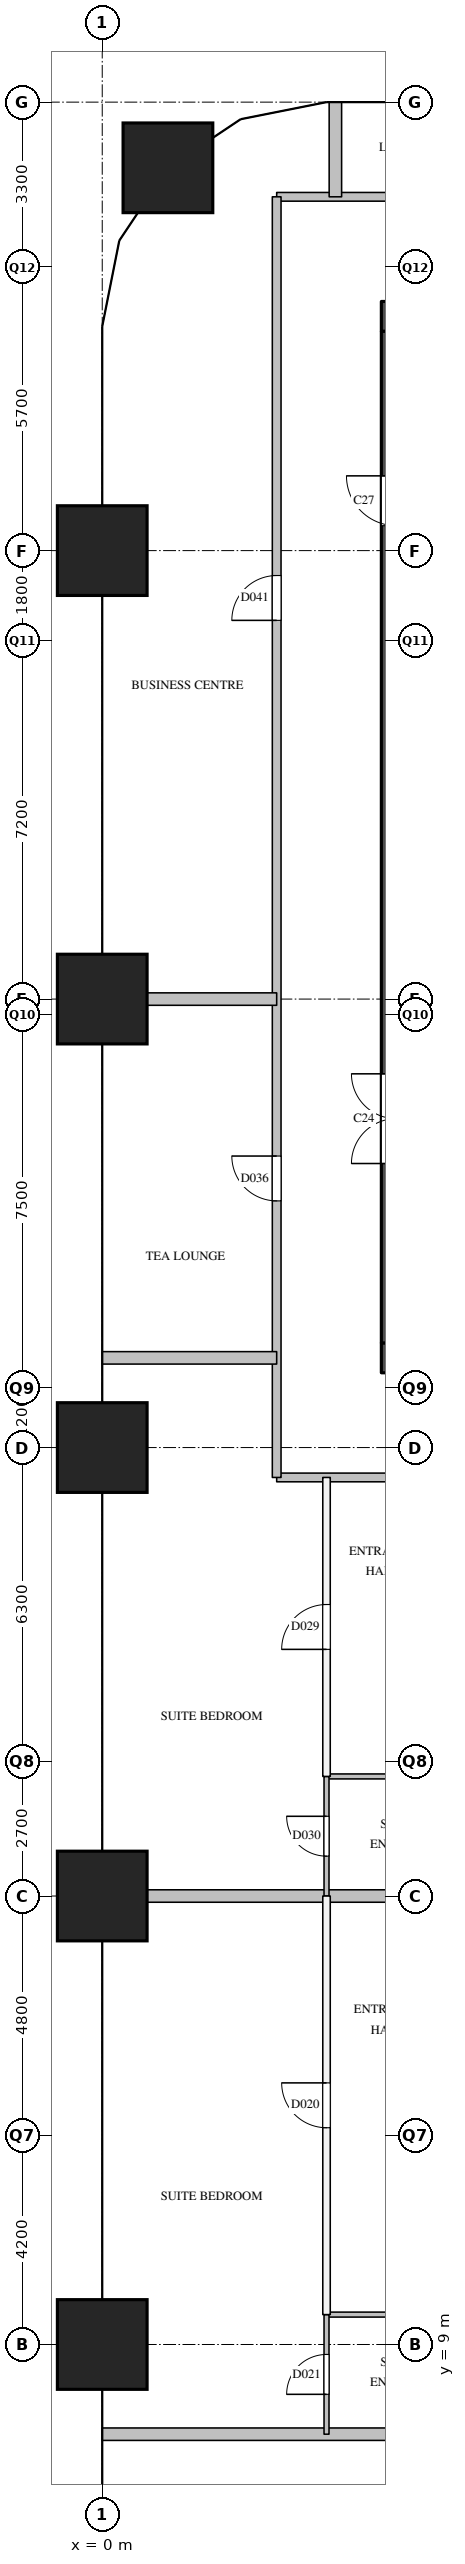
"""IFC4 building model, lengths in metres.
Left out: names, types, materials, properties, quantities, classifications, styles, units other than length and angle.
Written with IfcOpenShell. Run it as: python <this file> out.ifc"""

import sys

from ifc_helpers import new_model, si_unit, direction, frame, frame_2d, origin, origin_2d, place, context, subcontext, project, spatial, rectangle, extrude, element, fill, save


model = new_model("IFC4")
c1 = context("Model", 3, precision=1e-05, world=origin(), true_north=direction((0.0, 1.0)))
c2 = subcontext(c1, "Body", "Model", "MODEL_VIEW")
j1 = project(units=[si_unit("LENGTHUNIT", "METRE"), si_unit("PLANEANGLEUNIT", "RADIAN")], contexts=[c1])
p1 = place(None, origin())
s1 = spatial("IfcSite", under=j1, at=p1, CompositionType="ELEMENT")
p2 = place(p1, origin())
s2 = spatial("IfcBuilding", under=s1, at=p2, CompositionType="ELEMENT")
p3 = place(p2, frame((0.0, 0.0, 69.0)))
s3 = spatial("IfcBuildingStorey", under=s2, at=p3, CompositionType="ELEMENT", Elevation=69.0)
for number, where, z_axis, x_axis in (
    (1, (0.0, 9.0, 0.0), (0.0, 0.0, 1.0), (1.0, 0.0, 0.0)),
    (2, (0.0, 18.0, 0.0), (0.0, 0.0, 1.0), (1.0, 0.0, 0.0)),
    (3, (0.0, 27.0, 0.0), (0.0, 0.0, 1.0), (1.0, 0.0, 0.0)),
    (4, (0.0, 36.0, 0.0), (0.0, 0.0, 1.0), (1.0, 0.0, 0.0)),
    (5, (0.0, 45.0, 0.0), (0.0, 0.0, 1.0), (1.0, 0.0, 0.0)),
    (6, (1.318, 52.682, 0.0), (0.0, 0.0, 1.0), (1.0, 0.0, 0.0)),
):
    element("IfcColumn", number, at=place(p3, frame(where, z_axis=z_axis, x_axis=x_axis)), inside=s3, PredefinedType="COLUMN", context=c2, shape_type="SweptSolid", body=[
        extrude(rectangle(XDim=1.8, YDim=1.8, at=origin_2d()), origin(), (0.0, 0.0, 1.0), 3.8),
    ])
p4 = place(p3, frame((5.6, 28.8, 0.0), z_axis=(0.0, 0.0, 1.0), x_axis=(1.0, 0.0, 0.0)))
e7 = element("IfcWall", 7, at=p4, inside=s3, PredefinedType="SHEAR", context=c2, shape_type="SweptSolid", body=[
    extrude(rectangle(XDim=12.4, YDim=0.6, at=frame_2d((6.2, 0.0))), origin(), (0.0, 0.0, 1.0), 3.5),
])
p5 = place(p4, frame((1.05, 0.0, 0.0)))
e8 = element("IfcOpeningElement", 8, at=p5, cuts=e7, PredefinedType="OPENING", context=c2, shape_type="SweptSolid", body=[
    extrude(rectangle(XDim=1.2, YDim=2.1, at=frame_2d((0.6, 1.05))), frame((0.0, 0.31, 0.0), z_axis=(0.0, -1.0, 0.0), x_axis=(1.0, 0.0, 0.0)), (0.0, 0.0, 1.0), 0.62),
])
p6 = place(p4, frame((5.25, 0.0, 0.0)))
e9 = element("IfcOpeningElement", 9, at=p6, cuts=e7, PredefinedType="OPENING", context=c2, shape_type="SweptSolid", body=[
    extrude(rectangle(XDim=1.2, YDim=2.1, at=frame_2d((0.6, 1.05))), frame((0.0, 0.31, 0.0), z_axis=(0.0, -1.0, 0.0), x_axis=(1.0, 0.0, 0.0)), (0.0, 0.0, 1.0), 0.62),
])
p7 = place(p4, frame((7.35, 0.0, 0.0)))
e10 = element("IfcOpeningElement", 10, at=p7, cuts=e7, PredefinedType="OPENING", context=c2, shape_type="SweptSolid", body=[
    extrude(rectangle(XDim=1.2, YDim=2.1, at=frame_2d((0.6, 1.05))), frame((0.0, 0.31, 0.0), z_axis=(0.0, -1.0, 0.0), x_axis=(1.0, 0.0, 0.0)), (0.0, 0.0, 1.0), 0.62),
])
p8 = place(p3, frame((5.6, 49.7, 0.0), z_axis=(0.0, 0.0, 1.0), x_axis=(1.0, 0.0, 0.0)))
e11 = element("IfcWall", 11, at=p8, inside=s3, PredefinedType="SHEAR", context=c2, shape_type="SweptSolid", body=[
    extrude(rectangle(XDim=12.4, YDim=0.6, at=frame_2d((6.2, 0.0))), origin(), (0.0, 0.0, 1.0), 3.5),
])
p9 = place(p3, frame((5.9, 29.1, 0.0), z_axis=(0.0, 0.0, 1.0), x_axis=(0.0, 1.0, 0.0)))
e12 = element("IfcWall", 12, at=p9, inside=s3, PredefinedType="SHEAR", context=c2, shape_type="SweptSolid", body=[
    extrude(rectangle(XDim=20.3, YDim=0.6, at=frame_2d((10.15, 0.0))), origin(), (0.0, 0.0, 1.0), 3.5),
])
p10 = place(p9, frame((3.6, 0.0, 0.0)))
e13 = element("IfcOpeningElement", 13, at=p10, cuts=e12, PredefinedType="OPENING", context=c2, shape_type="SweptSolid", body=[
    extrude(rectangle(XDim=1.8, YDim=2.1, at=frame_2d((0.9, 1.05))), frame((0.0, 0.31, 0.0), z_axis=(0.0, -1.0, 0.0), x_axis=(1.0, 0.0, 0.0)), (0.0, 0.0, 1.0), 0.62),
])
p11 = place(p9, frame((16.4, 0.0, 0.0)))
e14 = element("IfcOpeningElement", 14, at=p11, cuts=e12, PredefinedType="OPENING", context=c2, shape_type="SweptSolid", body=[
    extrude(rectangle(XDim=1.0, YDim=2.1, at=frame_2d((0.5, 1.05))), frame((0.0, 0.31, 0.0), z_axis=(0.0, -1.0, 0.0), x_axis=(1.0, 0.0, 0.0)), (0.0, 0.0, 1.0), 0.62),
])
p12 = place(p3, frame((3.5, 26.4, 0.0), z_axis=(0.0, 0.0, 1.0), x_axis=(1.0, 0.0, 0.0)))
e15 = element("IfcWall", 15, at=p12, inside=s3, PredefinedType="PARTITIONING", context=c2, shape_type="SweptSolid", body=[
    extrude(rectangle(XDim=3.18, YDim=0.175, at=frame_2d((1.59, 0.0))), origin(), (0.0, 0.0, 1.0), 3.5),
])
p13 = place(p3, frame((3.5, 52.1, 0.0), z_axis=(0.0, 0.0, 1.0), x_axis=(1.0, 0.0, 0.0)))
e16 = element("IfcWall", 16, at=p13, inside=s3, PredefinedType="PARTITIONING", context=c2, shape_type="SweptSolid", body=[
    extrude(rectangle(XDim=16.6, YDim=0.175, at=frame_2d((8.3, 0.0))), origin(), (0.0, 0.0, 1.0), 3.5),
])
p14 = place(p13, frame((7.389, 0.0, 0.0)))
e17 = element("IfcOpeningElement", 17, at=p14, cuts=e16, PredefinedType="OPENING", context=c2, shape_type="SweptSolid", body=[
    extrude(rectangle(XDim=0.9, YDim=2.1, at=frame_2d((0.45, 1.05))), frame((0.0, 0.097, 0.0), z_axis=(0.0, -1.0, 0.0), x_axis=(1.0, 0.0, 0.0)), (0.0, 0.0, 1.0), 0.195),
])
p15 = place(p3, frame((3.5, 26.4, 0.0), z_axis=(0.0, 0.0, 1.0), x_axis=(0.0, 1.0, 0.0)))
e18 = element("IfcWall", 18, at=p15, inside=s3, PredefinedType="PARTITIONING", context=c2, shape_type="SweptSolid", body=[
    extrude(rectangle(XDim=25.7, YDim=0.175, at=frame_2d((12.85, 0.0))), origin(), (0.0, 0.0, 1.0), 2.5),
])
p16 = place(p15, frame((5.55, 0.0, 0.0)))
e19 = element("IfcOpeningElement", 19, at=p16, cuts=e18, PredefinedType="OPENING", context=c2, shape_type="SweptSolid", body=[
    extrude(rectangle(XDim=0.9, YDim=2.1, at=frame_2d((0.45, 1.05))), frame((0.0, 0.097, 0.0), z_axis=(0.0, -1.0, 0.0), x_axis=(1.0, 0.0, 0.0)), (0.0, 0.0, 1.0), 0.195),
])
p17 = place(p15, frame((17.2, 0.0, 0.0)))
e20 = element("IfcOpeningElement", 20, at=p17, cuts=e18, PredefinedType="OPENING", context=c2, shape_type="SweptSolid", body=[
    extrude(rectangle(XDim=0.9, YDim=2.1, at=frame_2d((0.45, 1.05))), frame((0.0, 0.097, 0.0), z_axis=(0.0, -1.0, 0.0), x_axis=(1.0, 0.0, 0.0)), (0.0, 0.0, 1.0), 0.195),
])
p18 = place(p3, frame((4.5, 9.6, 0.0), z_axis=(0.0, 0.0, 1.0), x_axis=(0.0, 1.0, 0.0)))
e21 = element("IfcWall", 21, at=p18, inside=s3, PredefinedType="PARTITIONING", context=c2, shape_type="SweptSolid", body=[
    extrude(rectangle(XDim=8.4, YDim=0.15, at=frame_2d((4.2, 0.0))), origin(), (0.0, 0.0, 1.0), 3.5),
])
p19 = place(p18, frame((3.75, 0.0, 0.0)))
e22 = element("IfcOpeningElement", 22, at=p19, cuts=e21, PredefinedType="OPENING", context=c2, shape_type="SweptSolid", body=[
    extrude(rectangle(XDim=0.9, YDim=2.1, at=frame_2d((0.45, 1.05))), frame((0.0, 0.085, 0.0), z_axis=(0.0, -1.0, 0.0), x_axis=(1.0, 0.0, 0.0)), (0.0, 0.0, 1.0), 0.17),
])
p20 = place(p3, frame((4.5, 20.4, 0.0), z_axis=(0.0, 0.0, 1.0), x_axis=(0.0, 1.0, 0.0)))
e23 = element("IfcWall", 23, at=p20, inside=s3, PredefinedType="PARTITIONING", context=c2, shape_type="SweptSolid", body=[
    extrude(rectangle(XDim=6.0, YDim=0.15, at=frame_2d((3.0, 0.0))), origin(), (0.0, 0.0, 1.0), 3.5),
])
p21 = place(p20, frame((2.55, 0.0, 0.0)))
e24 = element("IfcOpeningElement", 24, at=p21, cuts=e23, PredefinedType="OPENING", context=c2, shape_type="SweptSolid", body=[
    extrude(rectangle(XDim=0.9, YDim=2.1, at=frame_2d((0.45, 1.05))), frame((0.0, 0.085, 0.0), z_axis=(0.0, -1.0, 0.0), x_axis=(1.0, 0.0, 0.0)), (0.0, 0.0, 1.0), 0.17),
])
p22 = place(p3, frame((0.0, 7.2, 0.0), z_axis=(0.0, 0.0, 1.0), x_axis=(1.0, 0.0, 0.0)))
e25 = element("IfcWall", 25, at=p22, inside=s3, PredefinedType="PARTITIONING", context=c2, shape_type="SweptSolid", body=[
    extrude(rectangle(XDim=6.9, YDim=0.25, at=frame_2d((3.45, 0.0))), origin(), (0.0, 0.0, 1.0), 2.5),
])
p23 = place(p3, frame((0.0, 18.0, 0.0), z_axis=(0.0, 0.0, 1.0), x_axis=(1.0, 0.0, 0.0)))
e26 = element("IfcWall", 26, at=p23, inside=s3, PredefinedType="PARTITIONING", context=c2, shape_type="SweptSolid", body=[
    extrude(rectangle(XDim=6.9, YDim=0.25, at=frame_2d((3.45, 0.0))), origin(), (0.0, 0.0, 1.0), 3.5),
])
p24 = place(p3, frame((0.0, 28.8, 0.0), z_axis=(0.0, 0.0, 1.0), x_axis=(1.0, 0.0, 0.0)))
e27 = element("IfcWall", 27, at=p24, inside=s3, PredefinedType="PARTITIONING", context=c2, shape_type="SweptSolid", body=[
    extrude(rectangle(XDim=3.5, YDim=0.25, at=frame_2d((1.75, 0.0))), origin(), (0.0, 0.0, 1.0), 2.5),
])
p25 = place(p3, frame((0.0, 36.0, 0.0), z_axis=(0.0, 0.0, 1.0), x_axis=(1.0, 0.0, 0.0)))
e28 = element("IfcWall", 28, at=p25, inside=s3, PredefinedType="PARTITIONING", context=c2, shape_type="SweptSolid", body=[
    extrude(rectangle(XDim=3.5, YDim=0.25, at=frame_2d((1.75, 0.0))), origin(), (0.0, 0.0, 1.0), 3.5),
])
p26 = place(p3, frame((4.678, 52.1, 0.0), z_axis=(0.0, 0.0, 1.0), x_axis=(0.0, 1.0, 0.0)))
e29 = element("IfcWall", 29, at=p26, inside=s3, PredefinedType="PARTITIONING", context=c2, shape_type="SweptSolid", body=[
    extrude(rectangle(XDim=1.9, YDim=0.25, at=frame_2d((0.95, 0.0))), origin(), (0.0, 0.0, 1.0), 2.5),
])
for number, where, z_axis, x_axis in (
    (30, (4.5, 9.6, 0.0), (0.0, 0.0, 1.0), (1.0, 0.0, 0.0)),
    (31, (4.5, 20.4, 0.0), (0.0, 0.0, 1.0), (1.0, 0.0, 0.0)),
):
    element("IfcWall", number, at=place(p3, frame(where, z_axis=z_axis, x_axis=x_axis)), inside=s3, PredefinedType="PARTITIONING", context=c2, shape_type="SweptSolid", body=[
        extrude(rectangle(XDim=2.4, YDim=0.1, at=frame_2d((1.2, 0.0))), origin(), (0.0, 0.0, 1.0), 3.5),
    ])
p27 = place(p3, frame((4.5, 7.2, 0.0), z_axis=(0.0, 0.0, 1.0), x_axis=(0.0, 1.0, 0.0)))
e32 = element("IfcWall", 32, at=p27, inside=s3, PredefinedType="PARTITIONING", context=c2, shape_type="SweptSolid", body=[
    extrude(rectangle(XDim=2.4, YDim=0.1, at=frame_2d((1.2, 0.0))), origin(), (0.0, 0.0, 1.0), 3.5),
])
p28 = place(p27, frame((0.8, 0.0, 0.0)))
e33 = element("IfcOpeningElement", 33, at=p28, cuts=e32, PredefinedType="OPENING", context=c2, shape_type="SweptSolid", body=[
    extrude(rectangle(XDim=0.8, YDim=2.1, at=frame_2d((0.4, 1.05))), frame((0.0, 0.06, 0.0), z_axis=(0.0, -1.0, 0.0), x_axis=(1.0, 0.0, 0.0)), (0.0, 0.0, 1.0), 0.12),
])
p29 = place(p3, frame((4.5, 18.0, 0.0), z_axis=(0.0, 0.0, 1.0), x_axis=(0.0, 1.0, 0.0)))
e34 = element("IfcWall", 34, at=p29, inside=s3, PredefinedType="PARTITIONING", context=c2, shape_type="SweptSolid", body=[
    extrude(rectangle(XDim=2.4, YDim=0.1, at=frame_2d((1.2, 0.0))), origin(), (0.0, 0.0, 1.0), 3.5),
])
p30 = place(p29, frame((0.8, 0.0, 0.0)))
e35 = element("IfcOpeningElement", 35, at=p30, cuts=e34, PredefinedType="OPENING", context=c2, shape_type="SweptSolid", body=[
    extrude(rectangle(XDim=0.8, YDim=2.1, at=frame_2d((0.4, 1.05))), frame((0.0, 0.06, 0.0), z_axis=(0.0, -1.0, 0.0), x_axis=(1.0, 0.0, 0.0)), (0.0, 0.0, 1.0), 0.12),
])
p31 = place(p19, origin())
e36 = element("IfcDoor", 36, at=p31, inside=s3, OperationType="SINGLE_SWING_RIGHT", PredefinedType="DOOR", context=c2, shape_type="SweptSolid", body=[
    extrude(rectangle(XDim=0.9, YDim=2.1, at=frame_2d((0.45, 1.05))), frame((0.0, 0.025, 0.0), z_axis=(0.0, -1.0, 0.0), x_axis=(1.0, 0.0, 0.0)), (0.0, 0.0, 1.0), 0.05),
])
fill(e22, e36)
p32 = place(p28, origin())
e37 = element("IfcDoor", 37, at=p32, inside=s3, OperationType="SINGLE_SWING_LEFT", PredefinedType="DOOR", context=c2, shape_type="SweptSolid", body=[
    extrude(rectangle(XDim=0.8, YDim=2.1, at=frame_2d((0.4, 1.05))), frame((0.0, 0.025, 0.0), z_axis=(0.0, -1.0, 0.0), x_axis=(1.0, 0.0, 0.0)), (0.0, 0.0, 1.0), 0.05),
])
fill(e33, e37)
p33 = place(p21, origin())
e38 = element("IfcDoor", 38, at=p33, inside=s3, OperationType="SINGLE_SWING_LEFT", PredefinedType="DOOR", context=c2, shape_type="SweptSolid", body=[
    extrude(rectangle(XDim=0.9, YDim=2.1, at=frame_2d((0.45, 1.05))), frame((0.0, 0.025, 0.0), z_axis=(0.0, -1.0, 0.0), x_axis=(1.0, 0.0, 0.0)), (0.0, 0.0, 1.0), 0.05),
])
fill(e24, e38)
p34 = place(p30, origin())
e39 = element("IfcDoor", 39, at=p34, inside=s3, OperationType="SINGLE_SWING_RIGHT", PredefinedType="DOOR", context=c2, shape_type="SweptSolid", body=[
    extrude(rectangle(XDim=0.8, YDim=2.1, at=frame_2d((0.4, 1.05))), frame((0.0, 0.025, 0.0), z_axis=(0.0, -1.0, 0.0), x_axis=(1.0, 0.0, 0.0)), (0.0, 0.0, 1.0), 0.05),
])
fill(e35, e39)
p35 = place(p16, origin())
e40 = element("IfcDoor", 40, at=p35, inside=s3, OperationType="SINGLE_SWING_RIGHT", PredefinedType="DOOR", context=c2, shape_type="SweptSolid", body=[
    extrude(rectangle(XDim=0.9, YDim=2.1, at=frame_2d((0.45, 1.05))), frame((0.0, 0.025, 0.0), z_axis=(0.0, -1.0, 0.0), x_axis=(1.0, 0.0, 0.0)), (0.0, 0.0, 1.0), 0.05),
])
fill(e19, e40)
p36 = place(p17, origin())
e41 = element("IfcDoor", 41, at=p36, inside=s3, OperationType="SINGLE_SWING_LEFT", PredefinedType="DOOR", context=c2, shape_type="SweptSolid", body=[
    extrude(rectangle(XDim=0.9, YDim=2.1, at=frame_2d((0.45, 1.05))), frame((0.0, 0.025, 0.0), z_axis=(0.0, -1.0, 0.0), x_axis=(1.0, 0.0, 0.0)), (0.0, 0.0, 1.0), 0.05),
])
fill(e20, e41)
save(model, sys.argv[1])
